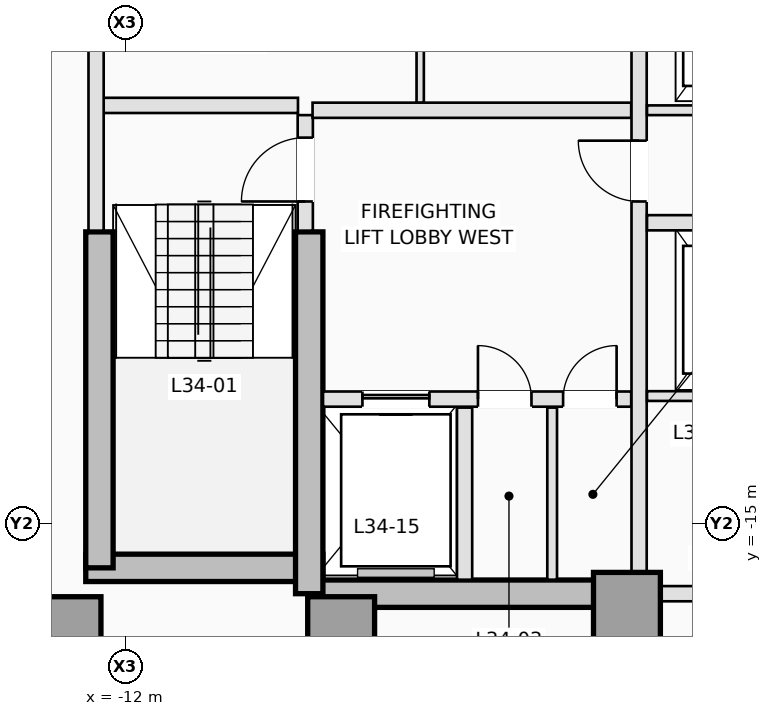
"""IFC4 building model, lengths in metres.
Left out: names, types, materials, properties, quantities, classifications, styles, units other than length and angle.
Written with IfcOpenShell. Run it as: python <this file> out.ifc"""

import sys

from ifc_helpers import new_model, si_unit, direction, frame, frame_2d, origin, origin_2d, place, context, subcontext, project, spatial, rectangle, extrude, element, fill, save


model = new_model("IFC4")
c1 = context("Model", 3, precision=1e-05, world=origin(), true_north=direction((0.0, 1.0)))
c2 = subcontext(c1, "Body", "Model", "MODEL_VIEW")
j1 = project(units=[si_unit("LENGTHUNIT", "METRE"), si_unit("PLANEANGLEUNIT", "RADIAN")], contexts=[c1])
p1 = place(None, origin())
s1 = spatial("IfcSite", under=j1, at=p1, CompositionType="ELEMENT")
p2 = place(p1, origin())
s2 = spatial("IfcBuilding", under=s1, at=p2, CompositionType="ELEMENT")
p3 = place(p2, frame((0.0, 0.0, 126.5)))
s3 = spatial("IfcBuildingStorey", under=s2, at=p3, CompositionType="ELEMENT", Elevation=126.5)
p4 = place(p3, frame((-12.65, -15.725, 0.0), z_axis=(0.0, 0.0, 1.0), x_axis=(1.0, 0.0, 0.0)))
e1 = element("IfcWall", 1, at=p4, inside=s3, PredefinedType="SHEAR", context=c2, shape_type="SweptSolid", body=[
    extrude(rectangle(XDim=3.9, YDim=0.45, at=frame_2d((1.95, 0.0))), origin(), (0.0, 0.0, 1.0), 3.5),
])
p5 = place(p3, frame((-8.975, -16.15, 0.0), z_axis=(0.0, 0.0, 1.0), x_axis=(1.0, 0.0, 0.0)))
e2 = element("IfcWall", 2, at=p5, inside=s3, PredefinedType="SHEAR", context=c2, shape_type="SweptSolid", body=[
    extrude(rectangle(XDim=5.225, YDim=0.45, at=frame_2d((2.613, 0.0))), origin(), (0.0, 0.0, 1.0), 3.5),
])
p6 = place(p3, frame((-12.425, -15.725, 0.0), z_axis=(0.0, 0.0, 1.0), x_axis=(0.0, 1.0, 0.0)))
e3 = element("IfcWall", 3, at=p6, inside=s3, PredefinedType="SHEAR", context=c2, shape_type="SweptSolid", body=[
    extrude(rectangle(XDim=5.525, YDim=0.45, at=frame_2d((2.763, 0.0))), origin(), (0.0, 0.0, 1.0), 3.5),
])
p7 = place(p3, frame((-8.975, -16.15, 0.0), z_axis=(0.0, 0.0, 1.0), x_axis=(0.0, 1.0, 0.0)))
e4 = element("IfcWall", 4, at=p7, inside=s3, PredefinedType="SHEAR", context=c2, shape_type="SweptSolid", body=[
    extrude(rectangle(XDim=5.95, YDim=0.45, at=frame_2d((2.975, 0.0))), origin(), (0.0, 0.0, 1.0), 3.5),
])
for number, where, z_axis, x_axis in (
    (5, (-12.95, -16.75, 0.0), (0.0, 0.0, 1.0), (1.0, 0.0, 0.0)),
    (6, (-8.45, -16.75, 0.0), (0.0, 0.0, 1.0), (1.0, 0.0, 0.0)),
    (7, (-3.75, -16.35, 0.0), (0.0, 0.0, 1.0), (1.0, 0.0, 0.0)),
):
    element("IfcColumn", number, at=place(p3, frame(where, z_axis=z_axis, x_axis=x_axis)), inside=s3, PredefinedType="COLUMN", context=c2, shape_type="SweptSolid", body=[
        extrude(rectangle(XDim=1.1, YDim=1.1, at=origin_2d()), origin(), (0.0, 0.0, 1.0), 3.5),
    ])
p8 = place(p3, frame((-9.04, -10.18, 0.0), z_axis=(0.0, 0.0, 1.0), x_axis=(0.0, 1.0, 0.0)))
e8 = element("IfcWall", 8, at=p8, inside=s3, PredefinedType="PARTITIONING", context=c2, shape_type="SweptSolid", body=[
    extrude(rectangle(XDim=1.9, YDim=0.25, at=frame_2d((0.95, 0.0))), origin(), (0.0, 0.0, 1.0), 3.25),
])
p9 = place(p8, frame((0.48, 0.0, 0.0)))
e9 = element("IfcOpeningElement", 9, at=p9, cuts=e8, PredefinedType="OPENING", context=c2, shape_type="SweptSolid", body=[
    extrude(rectangle(XDim=1.05, YDim=2.15, at=frame_2d((0.525, 1.075))), frame((0.0, 0.135, 0.0), z_axis=(0.0, -1.0, 0.0), x_axis=(1.0, 0.0, 0.0)), (0.0, 0.0, 1.0), 0.27),
])
p10 = place(p3, frame((-12.38, -8.12, 0.0), z_axis=(0.0, 0.0, 1.0), x_axis=(1.0, 0.0, 0.0)))
e10 = element("IfcWall", 10, at=p10, inside=s3, PredefinedType="PARTITIONING", context=c2, shape_type="SweptSolid", body=[
    extrude(rectangle(XDim=3.22, YDim=0.25, at=frame_2d((1.61, 0.0))), origin(), (0.0, 0.0, 1.0), 3.25),
])
p11 = place(p3, frame((-12.48, -10.18, 0.0), z_axis=(0.0, 0.0, 1.0), x_axis=(0.0, 1.0, 0.0)))
e11 = element("IfcWall", 11, at=p11, inside=s3, PredefinedType="PARTITIONING", context=c2, shape_type="SweptSolid", body=[
    extrude(rectangle(XDim=4.828, YDim=0.25, at=frame_2d((2.414, 0.0))), origin(), (0.0, 0.0, 1.0), 3.25),
])
p12 = place(p3, frame((-8.748, -12.95, 0.0), z_axis=(0.0, 0.0, 1.0), x_axis=(1.0, 0.0, 0.0)))
e12 = element("IfcWall", 12, at=p12, inside=s3, PredefinedType="PARTITIONING", context=c2, shape_type="SweptSolid", body=[
    extrude(rectangle(XDim=5.068, YDim=0.25, at=frame_2d((2.534, 0.0))), origin(), (0.0, 0.0, 1.0), 3.25),
])
p13 = place(p12, frame((0.648, 0.0, 0.0)))
e13 = element("IfcOpeningElement", 13, at=p13, cuts=e12, PredefinedType="OPENING", context=c2, shape_type="SweptSolid", body=[
    extrude(rectangle(XDim=1.1, YDim=2.15, at=frame_2d((0.55, 1.075))), frame((0.0, 0.135, 0.0), z_axis=(0.0, -1.0, 0.0), x_axis=(1.0, 0.0, 0.0)), (0.0, 0.0, 1.0), 0.27),
])
p14 = place(p12, frame((2.548, 0.0, 0.0)))
e14 = element("IfcOpeningElement", 14, at=p14, cuts=e12, PredefinedType="OPENING", context=c2, shape_type="SweptSolid", body=[
    extrude(rectangle(XDim=0.88, YDim=2.1, at=frame_2d((0.44, 1.05))), frame((0.0, 0.135, 0.0), z_axis=(0.0, -1.0, 0.0), x_axis=(1.0, 0.0, 0.0)), (0.0, 0.0, 1.0), 0.27),
])
p15 = place(p12, frame((3.948, 0.0, 0.0)))
e15 = element("IfcOpeningElement", 15, at=p15, cuts=e12, PredefinedType="OPENING", context=c2, shape_type="SweptSolid", body=[
    extrude(rectangle(XDim=0.88, YDim=2.1, at=frame_2d((0.44, 1.05))), frame((0.0, 0.135, 0.0), z_axis=(0.0, -1.0, 0.0), x_axis=(1.0, 0.0, 0.0)), (0.0, 0.0, 1.0), 0.27),
])
p16 = place(p3, frame((-6.42, -15.92, 0.0), z_axis=(0.0, 0.0, 1.0), x_axis=(0.0, 1.0, 0.0)))
e16 = element("IfcWall", 16, at=p16, inside=s3, PredefinedType="PARTITIONING", context=c2, shape_type="SweptSolid", body=[
    extrude(rectangle(XDim=2.83, YDim=0.25, at=frame_2d((1.415, 0.0))), origin(), (0.0, 0.0, 1.0), 3.25),
])
p17 = place(p3, frame((-4.98, -15.92, 0.0), z_axis=(0.0, 0.0, 1.0), x_axis=(0.0, 1.0, 0.0)))
e17 = element("IfcWall", 17, at=p17, inside=s3, PredefinedType="PARTITIONING", context=c2, shape_type="SweptSolid", body=[
    extrude(rectangle(XDim=2.83, YDim=0.16, at=frame_2d((1.415, 0.0))), origin(), (0.0, 0.0, 1.0), 3.25),
])
p18 = place(p3, frame((-8.92, -8.2, 0.0), z_axis=(0.0, 0.0, 1.0), x_axis=(1.0, 0.0, 0.0)))
e18 = element("IfcWall", 18, at=p18, inside=s3, PredefinedType="PARTITIONING", context=c2, shape_type="SweptSolid", body=[
    extrude(rectangle(XDim=5.24, YDim=0.25, at=frame_2d((2.62, 0.0))), origin(), (0.0, 0.0, 1.0), 3.25),
])
p19 = place(p3, frame((-3.55, -15.798, 0.0), z_axis=(0.0, 0.0, 1.0), x_axis=(0.0, 1.0, 0.0)))
e19 = element("IfcWall", 19, at=p19, inside=s3, PredefinedType="PARTITIONING", context=c2, shape_type="SweptSolid", body=[
    extrude(rectangle(XDim=10.446, YDim=0.25, at=frame_2d((5.223, 0.0))), origin(), (0.0, 0.0, 1.0), 3.25),
])
p20 = place(p19, frame((6.098, 0.0, 0.0)))
e20 = element("IfcOpeningElement", 20, at=p20, cuts=e19, PredefinedType="OPENING", context=c2, shape_type="SweptSolid", body=[
    extrude(rectangle(XDim=1.0, YDim=2.15, at=frame_2d((0.5, 1.075))), frame((0.0, 0.135, 0.0), z_axis=(0.0, -1.0, 0.0), x_axis=(1.0, 0.0, 0.0)), (0.0, 0.0, 1.0), 0.27),
])
p21 = place(p3, frame((-7.15, -8.073, 0.0), z_axis=(0.0, 0.0, 1.0), x_axis=(0.0, 1.0, 0.0)))
e21 = element("IfcWall", 21, at=p21, inside=s3, PredefinedType="PARTITIONING", context=c2, shape_type="SweptSolid", body=[
    extrude(rectangle(XDim=2.733, YDim=0.12, at=frame_2d((1.366, 0.0))), origin(), (0.0, 0.0, 1.0), 3.25),
])
p22 = place(p3, frame((-3.198, -16.15, 0.0), z_axis=(0.0, 0.0, 1.0), x_axis=(1.0, 0.0, 0.0)))
e22 = element("IfcWall", 22, at=p22, inside=s3, PredefinedType="PARTITIONING", context=c2, shape_type="SweptSolid", body=[
    extrude(rectangle(XDim=6.396, YDim=0.25, at=frame_2d((3.198, 0.0))), origin(), (0.0, 0.0, 1.0), 2.3),
])
p23 = place(p3, frame((-3.42, -8.2, 0.0), z_axis=(0.0, 0.0, 1.0), x_axis=(1.0, 0.0, 0.0)))
e23 = element("IfcWall", 23, at=p23, inside=s3, PredefinedType="PARTITIONING", context=c2, shape_type="SweptSolid", body=[
    extrude(rectangle(XDim=2.47, YDim=0.16, at=frame_2d((1.235, 0.0))), origin(), (0.0, 0.0, 1.0), 3.25),
])
p24 = place(p3, frame((-3.42, -10.05, 0.0), z_axis=(0.0, 0.0, 1.0), x_axis=(1.0, 0.0, 0.0)))
e24 = element("IfcWall", 24, at=p24, inside=s3, PredefinedType="PARTITIONING", context=c2, shape_type="SweptSolid", body=[
    extrude(rectangle(XDim=2.47, YDim=0.25, at=frame_2d((1.235, 0.0))), origin(), (0.0, 0.0, 1.0), 3.25),
])
p25 = place(p24, frame((0.92, 0.0, 0.0)))
e25 = element("IfcOpeningElement", 25, at=p25, cuts=e24, PredefinedType="OPENING", context=c2, shape_type="SweptSolid", body=[
    extrude(rectangle(XDim=1.0, YDim=2.15, at=frame_2d((0.5, 1.075))), frame((0.0, 0.135, 0.0), z_axis=(0.0, -1.0, 0.0), x_axis=(1.0, 0.0, 0.0)), (0.0, 0.0, 1.0), 0.27),
])
p26 = place(p3, frame((-3.42, -12.9, 0.0), z_axis=(0.0, 0.0, 1.0), x_axis=(1.0, 0.0, 0.0)))
e26 = element("IfcWall", 26, at=p26, inside=s3, PredefinedType="PARTITIONING", context=c2, shape_type="SweptSolid", body=[
    extrude(rectangle(XDim=6.84, YDim=0.16, at=frame_2d((3.42, 0.0))), origin(), (0.0, 0.0, 1.0), 3.25),
])
p27 = place(p26, frame((2.98, 0.0, 0.0)))
e27 = element("IfcOpeningElement", 27, at=p27, cuts=e26, PredefinedType="OPENING", context=c2, shape_type="SweptSolid", body=[
    extrude(rectangle(XDim=0.88, YDim=2.12, at=frame_2d((0.44, 1.06))), frame((0.0, 0.09, 0.0), z_axis=(0.0, -1.0, 0.0), x_axis=(1.0, 0.0, 0.0)), (0.0, 0.0, 1.0), 0.18),
])
p28 = place(p13, origin())
e28 = element("IfcDoor", 28, at=p28, inside=s3, OperationType="SLIDING_TO_LEFT", PredefinedType="DOOR", context=c2, shape_type="SweptSolid", body=[
    extrude(rectangle(XDim=1.1, YDim=2.15, at=frame_2d((0.55, 1.075))), frame((0.0, 0.025, 0.0), z_axis=(0.0, -1.0, 0.0), x_axis=(1.0, 0.0, 0.0)), (0.0, 0.0, 1.0), 0.05),
])
fill(e13, e28)
p29 = place(p9, origin())
e29 = element("IfcDoor", 29, at=p29, inside=s3, OperationType="SINGLE_SWING_LEFT", PredefinedType="DOOR", context=c2, shape_type="SweptSolid", body=[
    extrude(rectangle(XDim=1.05, YDim=2.15, at=frame_2d((0.525, 1.075))), frame((0.0, 0.025, 0.0), z_axis=(0.0, -1.0, 0.0), x_axis=(1.0, 0.0, 0.0)), (0.0, 0.0, 1.0), 0.05),
])
fill(e9, e29)
p30 = place(p14, origin())
e30 = element("IfcDoor", 30, at=p30, inside=s3, OperationType="SINGLE_SWING_LEFT", PredefinedType="TRAPDOOR", context=c2, shape_type="SweptSolid", body=[
    extrude(rectangle(XDim=0.88, YDim=2.1, at=frame_2d((0.44, 1.05))), frame((0.0, 0.025, 0.0), z_axis=(0.0, -1.0, 0.0), x_axis=(1.0, 0.0, 0.0)), (0.0, 0.0, 1.0), 0.05),
])
fill(e14, e30)
p31 = place(p15, origin())
e31 = element("IfcDoor", 31, at=p31, inside=s3, OperationType="SINGLE_SWING_RIGHT", PredefinedType="TRAPDOOR", context=c2, shape_type="SweptSolid", body=[
    extrude(rectangle(XDim=0.88, YDim=2.1, at=frame_2d((0.44, 1.05))), frame((0.0, 0.025, 0.0), z_axis=(0.0, -1.0, 0.0), x_axis=(1.0, 0.0, 0.0)), (0.0, 0.0, 1.0), 0.05),
])
fill(e15, e31)
p32 = place(p20, origin())
e32 = element("IfcDoor", 32, at=p32, inside=s3, OperationType="SINGLE_SWING_RIGHT", PredefinedType="DOOR", context=c2, shape_type="SweptSolid", body=[
    extrude(rectangle(XDim=1.0, YDim=2.15, at=frame_2d((0.5, 1.075))), frame((0.0, 0.025, 0.0), z_axis=(0.0, -1.0, 0.0), x_axis=(1.0, 0.0, 0.0)), (0.0, 0.0, 1.0), 0.05),
])
fill(e20, e32)
save(model, sys.argv[1])
